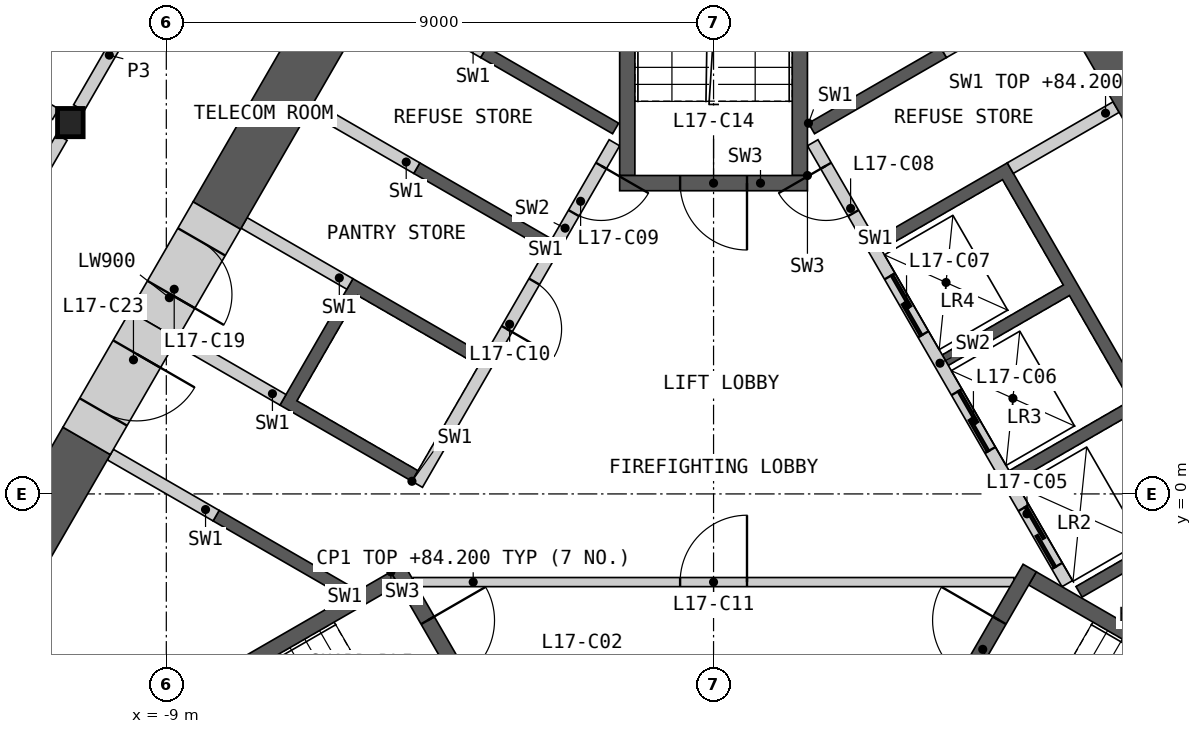
"""IFC4 building model, lengths in metres.
Left out: names, types, materials, properties, quantities, classifications, styles, units other than length and angle.
Written with IfcOpenShell. Run it as: python <this file> out.ifc"""

import sys

from ifc_helpers import new_model, si_unit, direction, frame, frame_2d, origin, origin_2d, place, context, subcontext, project, spatial, polyline, rectangle, i_section, outline, extrude, element, fill, save


model = new_model("IFC4")
c1 = context("Model", 3, precision=1e-05, world=origin(), true_north=direction((0.0, 1.0)))
c2 = subcontext(c1, "Body", "Model", "MODEL_VIEW")
j1 = project(units=[si_unit("LENGTHUNIT", "METRE"), si_unit("PLANEANGLEUNIT", "RADIAN")], contexts=[c1])
p1 = place(None, origin())
s1 = spatial("IfcSite", under=j1, at=p1, CompositionType="ELEMENT")
p2 = place(p1, origin())
s2 = spatial("IfcBuilding", under=s1, at=p2, CompositionType="ELEMENT")
p3 = place(p2, frame((0.0, 0.0, 80.4)))
s3 = spatial("IfcBuildingStorey", under=s2, at=p3, CompositionType="ELEMENT", Elevation=80.4)
p4 = place(p3, frame((-10.578, 6.107, 0.0), z_axis=(0.0, 0.0, 1.0), x_axis=(1.0, 0.0, 0.0)))
e1 = element("IfcColumn", 1, at=p4, inside=s3, PredefinedType="COLUMN", context=c2, shape_type="SweptSolid", body=[
    extrude(i_section(OverallWidth=0.421, OverallDepth=0.465, WebThickness=0.045, FlangeThickness=0.072, at=origin_2d()), origin(), (0.0, 0.0, 1.0), 4.2),
])
p5 = place(p3, origin())
e2 = element("IfcWall", 2, at=p5, inside=s3, PredefinedType="SHEAR", context=c2, shape_type="SweptSolid", body=[
    extrude(outline(polyline([(1.561, 6.097), (3.731, 7.35), (3.831, 7.177), (1.66, 5.924), (1.561, 6.097)])), origin(), (0.0, 0.0, 1.0), 3.8),
])
p6 = place(p3, origin())
e3 = element("IfcWall", 3, at=p6, inside=s3, PredefinedType="SHEAR", context=c2, shape_type="SweptSolid", body=[
    extrude(outline(polyline([(2.66, 4.192), (4.831, 5.445), (8.231, -0.444), (6.061, -1.697), (5.96, -1.524), (7.952, -0.374), (6.952, 1.358), (4.96, 0.208), (4.861, 0.381), (6.852, 1.531), (5.852, 3.263), (3.861, 2.113), (3.76, 2.287), (5.752, 3.437), (4.752, 5.169), (2.76, 4.019), (2.66, 4.192)])), origin(), (0.0, 0.0, 1.0), 3.8),
])
p7 = place(p3, frame((5.817, -1.476, 0.0), z_axis=(0.0, 0.0, 1.0), x_axis=(-0.500002616675, 0.866023893041, 0.0)))
e4 = element("IfcWall", 4, at=p7, inside=s3, PredefinedType="SOLIDWALL", context=c2, shape_type="SweptSolid", body=[
    extrude(rectangle(XDim=8.373, YDim=0.2, at=frame_2d((4.187, 0.0))), origin(), (0.0, 0.0, 1.0), 3.8),
])
p8 = place(p7, frame((0.337, 0.0, 0.0)))
e5 = element("IfcOpeningElement", 5, at=p8, cuts=e4, PredefinedType="OPENING", context=c2, shape_type="SweptSolid", body=[
    extrude(rectangle(XDim=1.1, YDim=2.1, at=frame_2d((0.55, 1.05))), frame((0.0, 0.11, 0.0), z_axis=(0.0, -1.0, 0.0), x_axis=(1.0, 0.0, 0.0)), (0.0, 0.0, 1.0), 0.22),
])
p9 = place(p7, frame((2.537, 0.0, 0.0)))
e6 = element("IfcOpeningElement", 6, at=p9, cuts=e4, PredefinedType="OPENING", context=c2, shape_type="SweptSolid", body=[
    extrude(rectangle(XDim=1.1, YDim=2.1, at=frame_2d((0.55, 1.05))), frame((0.0, 0.11, 0.0), z_axis=(0.0, -1.0, 0.0), x_axis=(1.0, 0.0, 0.0)), (0.0, 0.0, 1.0), 0.22),
])
p10 = place(p7, frame((4.737, 0.0, 0.0)))
e7 = element("IfcOpeningElement", 7, at=p10, cuts=e4, PredefinedType="OPENING", context=c2, shape_type="SweptSolid", body=[
    extrude(rectangle(XDim=1.1, YDim=2.1, at=frame_2d((0.55, 1.05))), frame((0.0, 0.11, 0.0), z_axis=(0.0, -1.0, 0.0), x_axis=(1.0, 0.0, 0.0)), (0.0, 0.0, 1.0), 0.22),
])
p11 = place(p7, frame((7.037, 0.0, 0.0)))
e8 = element("IfcOpeningElement", 8, at=p11, cuts=e4, PredefinedType="OPENING", context=c2, shape_type="SweptSolid", body=[
    extrude(rectangle(XDim=0.9, YDim=2.1, at=frame_2d((0.45, 1.05))), frame((0.0, 0.11, 0.0), z_axis=(0.0, -1.0, 0.0), x_axis=(1.0, 0.0, 0.0)), (0.0, 0.0, 1.0), 0.22),
])
p12 = place(p3, frame((4.881, 5.358, 0.0), z_axis=(0.0, 0.0, 1.0), x_axis=(0.866035824272, 0.499981950752, 0.0)))
e9 = element("IfcWall", 9, at=p12, inside=s3, PredefinedType="SHEAR", context=c2, shape_type="SweptSolid", body=[
    extrude(rectangle(XDim=2.009, YDim=0.2, at=frame_2d((1.004, 0.0))), origin(), (0.0, 0.0, 1.0), 3.8),
])
p13 = place(p3, frame((3.781, 7.263, 0.0), z_axis=(0.0, 0.0, 1.0), x_axis=(0.865983199114, 0.50007309351, 0.0)))
e10 = element("IfcWall", 10, at=p13, inside=s3, PredefinedType="SHEAR", context=c2, shape_type="SweptSolid", body=[
    extrude(rectangle(XDim=2.009, YDim=0.2, at=frame_2d((1.004, 0.0))), origin(), (0.0, 0.0, 1.0), 3.8),
])
p14 = place(p3, origin())
e11 = element("IfcWall", 11, at=p14, inside=s3, PredefinedType="SHEAR", context=c2, shape_type="SweptSolid", body=[
    extrude(outline(polyline([(-6.061, -1.697), (-8.231, -0.444), (-8.131, -0.271), (-5.96, -1.524), (-6.061, -1.697)])), origin(), (0.0, 0.0, 1.0), 3.8),
])
p15 = place(p3, origin())
e12 = element("IfcWall", 12, at=p15, inside=s3, PredefinedType="SHEAR", context=c2, shape_type="SweptSolid", body=[
    extrude(outline(polyline([(-4.96, 0.208), (-7.131, 1.461), (-5.931, 3.54), (-3.76, 2.287), (-3.861, 2.113), (-5.852, 3.263), (-6.852, 1.531), (-4.861, 0.381), (-4.96, 0.208)])), origin(), (0.0, 0.0, 1.0), 3.8),
])
p16 = place(p3, origin())
e13 = element("IfcWall", 13, at=p16, inside=s3, PredefinedType="SHEAR", context=c2, shape_type="SweptSolid", body=[
    extrude(outline(polyline([(-2.76, 4.019), (-4.931, 5.272), (-4.831, 5.445), (-2.66, 4.192), (-2.76, 4.019)])), origin(), (0.0, 0.0, 1.0), 3.8),
])
p17 = place(p3, origin())
e14 = element("IfcWall", 14, at=p17, inside=s3, PredefinedType="SHEAR", context=c2, shape_type="SweptSolid", body=[
    extrude(outline(polyline([(-3.731, 7.35), (-1.561, 6.097), (-1.66, 5.924), (-3.831, 7.177), (-3.731, 7.35)])), origin(), (0.0, 0.0, 1.0), 3.8),
])
p18 = place(p3, frame((-1.631, 5.776, 0.0), z_axis=(0.0, 0.0, 1.0), x_axis=(-0.499992876559, -0.866029516466, 0.0)))
e15 = element("IfcWall", 15, at=p18, inside=s3, PredefinedType="SOLIDWALL", context=c2, shape_type="SweptSolid", body=[
    extrude(rectangle(XDim=6.486, YDim=0.2, at=frame_2d((3.243, 0.0))), origin(), (0.0, 0.0, 1.0), 3.8),
])
p19 = place(p18, frame((0.437, 0.0, 0.0)))
e16 = element("IfcOpeningElement", 16, at=p19, cuts=e15, PredefinedType="OPENING", context=c2, shape_type="SweptSolid", body=[
    extrude(rectangle(XDim=0.9, YDim=2.1, at=frame_2d((0.45, 1.05))), frame((0.0, 0.11, 0.0), z_axis=(0.0, -1.0, 0.0), x_axis=(1.0, 0.0, 0.0)), (0.0, 0.0, 1.0), 0.22),
])
p20 = place(p18, frame((2.637, 0.0, 0.0)))
e17 = element("IfcOpeningElement", 17, at=p20, cuts=e15, PredefinedType="OPENING", context=c2, shape_type="SweptSolid", body=[
    extrude(rectangle(XDim=0.9, YDim=2.1, at=frame_2d((0.45, 1.05))), frame((0.0, 0.11, 0.0), z_axis=(0.0, -1.0, 0.0), x_axis=(1.0, 0.0, 0.0)), (0.0, 0.0, 1.0), 0.22),
])
p21 = place(p3, frame((-3.781, 7.263, 0.0), z_axis=(0.0, 0.0, 1.0), x_axis=(-0.865983199114, 0.50007309351, 0.0)))
e18 = element("IfcWall", 18, at=p21, inside=s3, PredefinedType="SHEAR", context=c2, shape_type="SweptSolid", body=[
    extrude(rectangle(XDim=2.009, YDim=0.2, at=frame_2d((1.004, 0.0))), origin(), (0.0, 0.0, 1.0), 3.8),
])
p22 = place(p3, frame((-4.881, 5.358, 0.0), z_axis=(0.0, 0.0, 1.0), x_axis=(-0.866035824272, 0.499981950752, 0.0)))
e19 = element("IfcWall", 19, at=p22, inside=s3, PredefinedType="SHEAR", context=c2, shape_type="SweptSolid", body=[
    extrude(rectangle(XDim=2.009, YDim=0.2, at=frame_2d((1.004, 0.0))), origin(), (0.0, 0.0, 1.0), 3.8),
])
p23 = place(p3, frame((-5.981, 3.453, 0.0), z_axis=(0.0, 0.0, 1.0), x_axis=(-0.866013584312, 0.500020471368, 0.0)))
e20 = element("IfcWall", 20, at=p23, inside=s3, PredefinedType="SHEAR", context=c2, shape_type="SweptSolid", body=[
    extrude(rectangle(XDim=2.009, YDim=0.2, at=frame_2d((1.005, 0.0))), origin(), (0.0, 0.0, 1.0), 3.8),
])
p24 = place(p3, frame((-7.081, 1.548, 0.0), z_axis=(0.0, 0.0, 1.0), x_axis=(-0.865983199114, 0.50007309351, 0.0)))
e21 = element("IfcWall", 21, at=p24, inside=s3, PredefinedType="SHEAR", context=c2, shape_type="SweptSolid", body=[
    extrude(rectangle(XDim=2.009, YDim=0.2, at=frame_2d((1.004, 0.0))), origin(), (0.0, 0.0, 1.0), 3.8),
])
p25 = place(p3, frame((-8.181, -0.357, 0.0), z_axis=(0.0, 0.0, 1.0), x_axis=(-0.866035824272, 0.499981950752, 0.0)))
e22 = element("IfcWall", 22, at=p25, inside=s3, PredefinedType="SHEAR", context=c2, shape_type="SweptSolid", body=[
    extrude(rectangle(XDim=2.009, YDim=0.2, at=frame_2d((1.004, 0.0))), origin(), (0.0, 0.0, 1.0), 3.8),
])
p26 = place(p3, frame((-4.941, -1.45, 0.0), z_axis=(0.0, 0.0, 1.0), x_axis=(1.0, 0.0, 0.0)))
e23 = element("IfcWall", 23, at=p26, inside=s3, PredefinedType="PARTITIONING", context=c2, shape_type="SweptSolid", body=[
    extrude(rectangle(XDim=9.882, YDim=0.15, at=frame_2d((4.941, 0.0))), origin(), (0.0, 0.0, 1.0), 3.8),
])
p27 = place(p26, frame((4.391, 0.0, 0.0)))
e24 = element("IfcOpeningElement", 24, at=p27, cuts=e23, PredefinedType="OPENING", context=c2, shape_type="SweptSolid", body=[
    extrude(rectangle(XDim=1.1, YDim=2.1, at=frame_2d((0.55, 1.05))), frame((0.0, 0.085, 0.0), z_axis=(0.0, -1.0, 0.0), x_axis=(1.0, 0.0, 0.0)), (0.0, 0.0, 1.0), 0.17),
])
p28 = place(p3, origin())
e25 = element("IfcWall", 25, at=p28, inside=s3, PredefinedType="SHEAR", context=c2, shape_type="SweptSolid", body=[
    extrude(outline(polyline([(-5.307, -1.281), (-10.374, -4.206), (-10.032, -4.298), (-5.182, -1.498), (-5.307, -1.281)])), origin(), (0.0, 0.0, 1.0), 3.8),
])
p29 = place(p3, frame((-5.199, -1.219, 0.0), z_axis=(0.0, 0.0, 1.0), x_axis=(0.499982516597, -0.866035497597, 0.0)))
e26 = element("IfcWall", 26, at=p29, inside=s3, PredefinedType="SHEAR", context=c2, shape_type="SweptSolid", body=[
    extrude(rectangle(XDim=3.088, YDim=0.25, at=frame_2d((1.544, 0.0))), origin(), (0.0, 0.0, 1.0), 3.8),
])
p30 = place(p29, frame((0.994, 0.0, 0.0)))
e27 = element("IfcOpeningElement", 27, at=p30, cuts=e26, PredefinedType="OPENING", context=c2, shape_type="SweptSolid", body=[
    extrude(rectangle(XDim=1.1, YDim=2.1, at=frame_2d((0.55, 1.05))), frame((0.0, 0.135, 0.0), z_axis=(0.0, -1.0, 0.0), x_axis=(1.0, 0.0, 0.0)), (0.0, 0.0, 1.0), 0.27),
])
p31 = place(p3, origin())
e28 = element("IfcWall", 28, at=p31, inside=s3, PredefinedType="SHEAR", context=c2, shape_type="SweptSolid", body=[
    extrude(outline(polyline([(10.032, -4.298), (10.374, -4.206), (5.307, -1.281), (5.182, -1.498), (10.032, -4.298)])), origin(), (0.0, 0.0, 1.0), 3.8),
])
p32 = place(p3, frame((3.655, -3.893, 0.0), z_axis=(0.0, 0.0, 1.0), x_axis=(0.499982516597, 0.866035497597, 0.0)))
e29 = element("IfcWall", 29, at=p32, inside=s3, PredefinedType="SHEAR", context=c2, shape_type="SweptSolid", body=[
    extrude(rectangle(XDim=3.088, YDim=0.25, at=frame_2d((1.544, 0.0))), origin(), (0.0, 0.0, 1.0), 3.8),
])
p33 = place(p32, frame((0.994, 0.0, 0.0)))
e30 = element("IfcOpeningElement", 30, at=p33, cuts=e29, PredefinedType="OPENING", context=c2, shape_type="SweptSolid", body=[
    extrude(rectangle(XDim=1.1, YDim=2.1, at=frame_2d((0.55, 1.05))), frame((0.0, 0.135, 0.0), z_axis=(0.0, -1.0, 0.0), x_axis=(1.0, 0.0, 0.0)), (0.0, 0.0, 1.0), 0.27),
])
p34 = place(p3, origin())
e31 = element("IfcWall", 31, at=p34, inside=s3, PredefinedType="SHEAR", context=c2, shape_type="SweptSolid", body=[
    extrude(outline(polyline([(1.544, 5.237), (1.544, 11.087), (1.294, 10.837), (1.294, 5.237), (1.544, 5.237)])), origin(), (0.0, 0.0, 1.0), 3.8),
])
p35 = place(p3, origin())
e32 = element("IfcWall", 32, at=p35, inside=s3, PredefinedType="SHEAR", context=c2, shape_type="SweptSolid", body=[
    extrude(outline(polyline([(-1.294, 10.837), (-1.544, 11.087), (-1.544, 5.237), (-1.294, 5.237), (-1.294, 10.837)])), origin(), (0.0, 0.0, 1.0), 3.8),
])
p36 = place(p3, frame((1.544, 5.112, 0.0), z_axis=(0.0, 0.0, 1.0), x_axis=(-1.0, 0.0, 0.0)))
e33 = element("IfcWall", 33, at=p36, inside=s3, PredefinedType="SHEAR", context=c2, shape_type="SweptSolid", body=[
    extrude(rectangle(XDim=3.088, YDim=0.25, at=frame_2d((1.544, 0.0))), origin(), (0.0, 0.0, 1.0), 3.8),
])
p37 = place(p36, frame((0.994, 0.0, 0.0)))
e34 = element("IfcOpeningElement", 34, at=p37, cuts=e33, PredefinedType="OPENING", context=c2, shape_type="SweptSolid", body=[
    extrude(rectangle(XDim=1.1, YDim=2.1, at=frame_2d((0.55, 1.05))), frame((0.0, 0.135, 0.0), z_axis=(0.0, -1.0, 0.0), x_axis=(1.0, 0.0, 0.0)), (0.0, 0.0, 1.0), 0.27),
])
p38 = place(p3, frame((7.646, 5.486, 0.0), z_axis=(0.0, 0.0, 1.0), x_axis=(-0.499982660725, 0.866035414388, 0.0)))
e35 = element("IfcWall", 35, at=p38, inside=s3, PredefinedType="SHEAR", context=c2, shape_type="SweptSolid", body=[
    extrude(rectangle(XDim=10.206, YDim=0.9, at=frame_2d((5.103, 0.0))), origin(), (0.0, 0.0, 1.0), 3.8),
])
p39 = place(p3, frame((-10.31, 0.872, 0.0), z_axis=(0.0, 0.0, 1.0), x_axis=(-0.499991697393, -0.866030197244, 0.0)))
e36 = element("IfcWall", 36, at=p39, inside=s3, PredefinedType="SHEAR", context=c2, shape_type="SweptSolid", body=[
    extrude(rectangle(XDim=11.041, YDim=0.9, at=frame_2d((5.521, 0.0))), origin(), (0.0, 0.0, 1.0), 3.8),
])
p40 = place(p3, frame((-4.514, 10.911, 0.0), z_axis=(0.0, 0.0, 1.0), x_axis=(-0.500006662879, -0.866021556935, 0.0)))
e37 = element("IfcWall", 37, at=p40, inside=s3, PredefinedType="SHEAR", context=c2, shape_type="SweptSolid", body=[
    extrude(rectangle(XDim=7.312, YDim=0.9, at=frame_2d((3.656, 0.0))), origin(), (0.0, 0.0, 1.0), 3.8),
])
p41 = place(p3, frame((-8.17, 4.579, 0.0), z_axis=(0.0, 0.0, 1.0), x_axis=(-0.499888406853, -0.866089822532, 0.0)))
e38 = element("IfcWall", 38, at=p41, inside=s3, PredefinedType="SHEAR", context=c2, shape_type="SweptSolid", body=[
    extrude(rectangle(XDim=2.08, YDim=0.9, at=frame_2d((1.04, 0.0))), origin(), (0.0, 0.0, 1.0), 3.8),
])
p42 = place(p41, frame((0.5, 0.0, 0.0)))
e39 = element("IfcOpeningElement", 39, at=p42, cuts=e38, PredefinedType="OPENING", context=c2, shape_type="SweptSolid", body=[
    extrude(rectangle(XDim=1.0, YDim=2.1, at=frame_2d((0.5, 1.05))), frame((0.0, 0.46, 0.0), z_axis=(0.0, -1.0, 0.0), x_axis=(1.0, 0.0, 0.0)), (0.0, 0.0, 1.0), 0.92),
])
p43 = place(p3, frame((-9.21, 2.777, 0.0), z_axis=(0.0, 0.0, 1.0), x_axis=(-0.500077893725, -0.86598042715, 0.0)))
e40 = element("IfcWall", 40, at=p43, inside=s3, PredefinedType="SHEAR", context=c2, shape_type="SweptSolid", body=[
    extrude(rectangle(XDim=2.2, YDim=0.9, at=frame_2d((1.1, 0.0))), origin(), (0.0, 0.0, 1.0), 3.8),
])
p44 = place(p43, frame((0.55, 0.0, 0.0)))
e41 = element("IfcOpeningElement", 41, at=p44, cuts=e40, PredefinedType="OPENING", context=c2, shape_type="SweptSolid", body=[
    extrude(rectangle(XDim=1.1, YDim=2.1, at=frame_2d((0.55, 1.05))), frame((0.0, 0.46, 0.0), z_axis=(0.0, -1.0, 0.0), x_axis=(1.0, 0.0, 0.0)), (0.0, 0.0, 1.0), 0.92),
])
p45 = place(p3, frame((-15.728, -2.811, 0.0), z_axis=(0.0, 0.0, 1.0), x_axis=(0.49999175339, 0.866030164915, 0.0)))
e42 = element("IfcWall", 42, at=p45, inside=s3, PredefinedType="PARTITIONING", context=c2, shape_type="SweptSolid", body=[
    extrude(rectangle(XDim=10.019, YDim=0.2, at=frame_2d((5.009, 0.0))), origin(), (0.0, 0.0, 1.0), 3.8),
])
p46 = place(p45, frame((4.76, 0.0, 0.0)))
e43 = element("IfcOpeningElement", 43, at=p46, cuts=e42, PredefinedType="OPENING", context=c2, shape_type="SweptSolid", body=[
    extrude(rectangle(XDim=1.0, YDim=2.1, at=frame_2d((0.5, 1.05))), frame((0.0, 0.11, 0.0), z_axis=(0.0, -1.0, 0.0), x_axis=(1.0, 0.0, 0.0)), (0.0, 0.0, 1.0), 0.22),
])
p47 = place(p3, frame((5.429, 15.026, 0.0), z_axis=(0.0, 0.0, 1.0), x_axis=(0.50001002959, -0.86601961312, 0.0)))
e44 = element("IfcWall", 44, at=p47, inside=s3, PredefinedType="PARTITIONING", context=c2, shape_type="SweptSolid", body=[
    extrude(rectangle(XDim=10.019, YDim=0.2, at=frame_2d((5.009, 0.0))), origin(), (0.0, 0.0, 1.0), 3.8),
])
p48 = place(p47, frame((4.76, 0.0, 0.0)))
e45 = element("IfcOpeningElement", 45, at=p48, cuts=e44, PredefinedType="OPENING", context=c2, shape_type="SweptSolid", body=[
    extrude(rectangle(XDim=1.0, YDim=2.1, at=frame_2d((0.5, 1.05))), frame((0.0, 0.11, 0.0), z_axis=(0.0, -1.0, 0.0), x_axis=(1.0, 0.0, 0.0)), (0.0, 0.0, 1.0), 0.22),
])
p49 = place(p3, frame((-10.439, 6.35, 0.0), z_axis=(0.0, 0.0, 1.0), x_axis=(0.50001002959, 0.86601961312, 0.0)))
e46 = element("IfcWall", 46, at=p49, inside=s3, PredefinedType="PARTITIONING", context=c2, shape_type="SweptSolid", body=[
    extrude(rectangle(XDim=10.019, YDim=0.2, at=frame_2d((5.009, 0.0))), origin(), (0.0, 0.0, 1.0), 3.8),
])
p50 = place(p49, frame((6.664, 0.0, 0.0)))
e47 = element("IfcOpeningElement", 47, at=p50, cuts=e46, PredefinedType="OPENING", context=c2, shape_type="SweptSolid", body=[
    extrude(rectangle(XDim=1.0, YDim=2.1, at=frame_2d((0.5, 1.05))), frame((0.0, 0.11, 0.0), z_axis=(0.0, -1.0, 0.0), x_axis=(1.0, 0.0, 0.0)), (0.0, 0.0, 1.0), 0.22),
])
p51 = place(p49, frame((1.854, 0.0, 0.0)))
e48 = element("IfcOpeningElement", 48, at=p51, cuts=e46, PredefinedType="OPENING", context=c2, shape_type="SweptSolid", body=[
    extrude(rectangle(XDim=1.0, YDim=2.1, at=frame_2d((0.5, 1.05))), frame((0.0, 0.11, 0.0), z_axis=(0.0, -1.0, 0.0), x_axis=(1.0, 0.0, 0.0)), (0.0, 0.0, 1.0), 0.22),
])
p52 = place(p3, frame((-21.947, 12.671, 0.0), z_axis=(0.0, 0.0, 1.0), x_axis=(0.866026729935, -0.499997703033, 0.0)))
e49 = element("IfcWall", 49, at=p52, inside=s3, PredefinedType="PARTITIONING", context=c2, shape_type="SweptSolid", body=[
    extrude(rectangle(XDim=12.848, YDim=0.2, at=frame_2d((6.424, 0.0))), origin(), (0.0, 0.0, 1.0), 2.885),
])
p53 = place(p8, origin())
e50 = element("IfcDoor", 50, at=p53, inside=s3, OperationType="SLIDING_TO_LEFT", PredefinedType="DOOR", context=c2, shape_type="SweptSolid", body=[
    extrude(rectangle(XDim=1.1, YDim=2.1, at=frame_2d((0.55, 1.05))), frame((0.0, 0.025, 0.0), z_axis=(0.0, -1.0, 0.0), x_axis=(1.0, 0.0, 0.0)), (0.0, 0.0, 1.0), 0.05),
])
fill(e5, e50)
p54 = place(p9, origin())
e51 = element("IfcDoor", 51, at=p54, inside=s3, OperationType="SLIDING_TO_LEFT", PredefinedType="DOOR", context=c2, shape_type="SweptSolid", body=[
    extrude(rectangle(XDim=1.1, YDim=2.1, at=frame_2d((0.55, 1.05))), frame((0.0, 0.025, 0.0), z_axis=(0.0, -1.0, 0.0), x_axis=(1.0, 0.0, 0.0)), (0.0, 0.0, 1.0), 0.05),
])
fill(e6, e51)
p55 = place(p10, origin())
e52 = element("IfcDoor", 52, at=p55, inside=s3, OperationType="SLIDING_TO_LEFT", PredefinedType="DOOR", context=c2, shape_type="SweptSolid", body=[
    extrude(rectangle(XDim=1.1, YDim=2.1, at=frame_2d((0.55, 1.05))), frame((0.0, 0.025, 0.0), z_axis=(0.0, -1.0, 0.0), x_axis=(1.0, 0.0, 0.0)), (0.0, 0.0, 1.0), 0.05),
])
fill(e7, e52)
p56 = place(p11, origin())
e53 = element("IfcDoor", 53, at=p56, inside=s3, OperationType="SINGLE_SWING_RIGHT", PredefinedType="DOOR", context=c2, shape_type="SweptSolid", body=[
    extrude(rectangle(XDim=0.9, YDim=2.1, at=frame_2d((0.45, 1.05))), frame((0.0, 0.025, 0.0), z_axis=(0.0, -1.0, 0.0), x_axis=(1.0, 0.0, 0.0)), (0.0, 0.0, 1.0), 0.05),
])
fill(e8, e53)
p57 = place(p19, origin())
e54 = element("IfcDoor", 54, at=p57, inside=s3, OperationType="SINGLE_SWING_LEFT", PredefinedType="DOOR", context=c2, shape_type="SweptSolid", body=[
    extrude(rectangle(XDim=0.9, YDim=2.1, at=frame_2d((0.45, 1.05))), frame((0.0, 0.025, 0.0), z_axis=(0.0, -1.0, 0.0), x_axis=(1.0, 0.0, 0.0)), (0.0, 0.0, 1.0), 0.05),
])
fill(e16, e54)
p58 = place(p20, origin())
e55 = element("IfcDoor", 55, at=p58, inside=s3, OperationType="SINGLE_SWING_RIGHT", PredefinedType="DOOR", context=c2, shape_type="SweptSolid", body=[
    extrude(rectangle(XDim=0.9, YDim=2.1, at=frame_2d((0.45, 1.05))), frame((0.0, 0.025, 0.0), z_axis=(0.0, -1.0, 0.0), x_axis=(1.0, 0.0, 0.0)), (0.0, 0.0, 1.0), 0.05),
])
fill(e17, e55)
p59 = place(p27, origin())
e56 = element("IfcDoor", 56, at=p59, inside=s3, OperationType="SINGLE_SWING_RIGHT", PredefinedType="DOOR", context=c2, shape_type="SweptSolid", body=[
    extrude(rectangle(XDim=1.1, YDim=2.1, at=frame_2d((0.55, 1.05))), frame((0.0, 0.025, 0.0), z_axis=(0.0, -1.0, 0.0), x_axis=(1.0, 0.0, 0.0)), (0.0, 0.0, 1.0), 0.05),
])
fill(e24, e56)
p60 = place(p30, origin())
e57 = element("IfcDoor", 57, at=p60, inside=s3, OperationType="SINGLE_SWING_LEFT", PredefinedType="DOOR", context=c2, shape_type="SweptSolid", body=[
    extrude(rectangle(XDim=1.1, YDim=2.1, at=frame_2d((0.55, 1.05))), frame((0.0, 0.025, 0.0), z_axis=(0.0, -1.0, 0.0), x_axis=(1.0, 0.0, 0.0)), (0.0, 0.0, 1.0), 0.05),
])
fill(e27, e57)
p61 = place(p33, origin())
e58 = element("IfcDoor", 58, at=p61, inside=s3, OperationType="SINGLE_SWING_RIGHT", PredefinedType="DOOR", context=c2, shape_type="SweptSolid", body=[
    extrude(rectangle(XDim=1.1, YDim=2.1, at=frame_2d((0.55, 1.05))), frame((0.0, 0.025, 0.0), z_axis=(0.0, -1.0, 0.0), x_axis=(1.0, 0.0, 0.0)), (0.0, 0.0, 1.0), 0.05),
])
fill(e30, e58)
p62 = place(p37, origin())
e59 = element("IfcDoor", 59, at=p62, inside=s3, OperationType="SINGLE_SWING_LEFT", PredefinedType="DOOR", context=c2, shape_type="SweptSolid", body=[
    extrude(rectangle(XDim=1.1, YDim=2.1, at=frame_2d((0.55, 1.05))), frame((0.0, 0.025, 0.0), z_axis=(0.0, -1.0, 0.0), x_axis=(1.0, 0.0, 0.0)), (0.0, 0.0, 1.0), 0.05),
])
fill(e34, e59)
p63 = place(p42, origin())
e60 = element("IfcDoor", 60, at=p63, inside=s3, OperationType="SINGLE_SWING_RIGHT", PredefinedType="DOOR", context=c2, shape_type="SweptSolid", body=[
    extrude(rectangle(XDim=1.0, YDim=2.1, at=frame_2d((0.5, 1.05))), frame((0.0, 0.205, 0.0), z_axis=(0.0, -1.0, 0.0), x_axis=(1.0, 0.0, 0.0)), (0.0, 0.0, 1.0), 0.05),
])
fill(e39, e60)
p64 = place(p44, origin())
e61 = element("IfcDoor", 61, at=p64, inside=s3, OperationType="SINGLE_SWING_LEFT", PredefinedType="DOOR", context=c2, shape_type="SweptSolid", body=[
    extrude(rectangle(XDim=1.1, YDim=2.1, at=frame_2d((0.55, 1.05))), frame((0.0, 0.205, 0.0), z_axis=(0.0, -1.0, 0.0), x_axis=(1.0, 0.0, 0.0)), (0.0, 0.0, 1.0), 0.05),
])
fill(e41, e61)
save(model, sys.argv[1])
